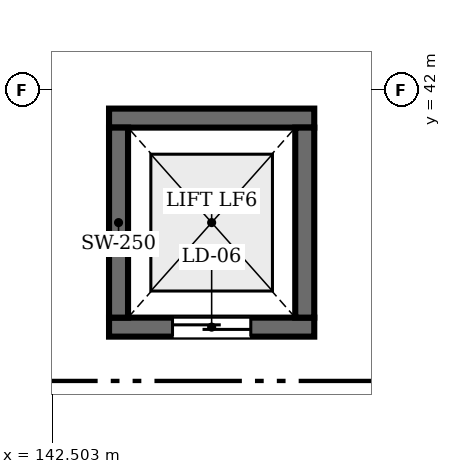
"""IFC4 building model, lengths in metres.
Left out: names, types, materials, properties, quantities, classifications, styles, units other than length and angle.
Written with IfcOpenShell. Run it as: python <this file> out.ifc"""

import sys

from ifc_helpers import new_model, si_unit, direction, frame, frame_2d, origin, place, context, subcontext, project, spatial, rectangle, extrude, element, fill, save


model = new_model("IFC4")
c1 = context("Model", 3, precision=1e-05, world=origin(), true_north=direction((0.0, 1.0)))
c2 = subcontext(c1, "Body", "Model", "MODEL_VIEW")
j1 = project(units=[si_unit("LENGTHUNIT", "METRE"), si_unit("PLANEANGLEUNIT", "RADIAN")], contexts=[c1])
p1 = place(None, origin())
s1 = spatial("IfcSite", under=j1, at=p1, CompositionType="ELEMENT")
p2 = place(p1, origin())
s2 = spatial("IfcBuilding", under=s1, at=p2, CompositionType="ELEMENT")
p3 = place(p2, frame((0.0, 0.0, -4.8)))
s3 = spatial("IfcBuildingStorey", under=s2, at=p3, CompositionType="ELEMENT", Elevation=-4.8)
p4 = place(p3, frame((143.25, 38.875, 0.0), z_axis=(0.0, 0.0, 1.0), x_axis=(1.0, 0.0, 0.0)))
e1 = element("IfcWall", 1, at=p4, inside=s3, PredefinedType="SHEAR", context=c2, shape_type="SweptSolid", body=[
    extrude(rectangle(XDim=2.7, YDim=0.25, at=frame_2d((1.35, 0.0))), origin(), (0.0, 0.0, 1.0), 4.395),
])
p5 = place(p4, frame((0.835, 0.0, 0.0)))
e2 = element("IfcOpeningElement", 2, at=p5, cuts=e1, PredefinedType="OPENING", context=c2, shape_type="SweptSolid", body=[
    extrude(rectangle(XDim=1.03, YDim=2.15, at=frame_2d((0.515, 1.075))), frame((0.0, 0.135, 0.0), z_axis=(0.0, -1.0, 0.0), x_axis=(1.0, 0.0, 0.0)), (0.0, 0.0, 1.0), 0.27),
])
p6 = place(p3, frame((143.25, 41.625, 0.0), z_axis=(0.0, 0.0, 1.0), x_axis=(1.0, 0.0, 0.0)))
e3 = element("IfcWall", 3, at=p6, inside=s3, PredefinedType="SHEAR", context=c2, shape_type="SweptSolid", body=[
    extrude(rectangle(XDim=2.7, YDim=0.25, at=frame_2d((1.35, 0.0))), origin(), (0.0, 0.0, 1.0), 4.395),
])
for number, where, z_axis, x_axis in (
    (4, (143.375, 39.0, 0.0), (0.0, 0.0, 1.0), (0.0, 1.0, 0.0)),
    (5, (145.825, 39.0, 0.0), (0.0, 0.0, 1.0), (0.0, 1.0, 0.0)),
):
    element("IfcWall", number, at=place(p3, frame(where, z_axis=z_axis, x_axis=x_axis)), inside=s3, PredefinedType="SHEAR", context=c2, shape_type="SweptSolid", body=[
        extrude(rectangle(XDim=2.5, YDim=0.25, at=frame_2d((1.25, 0.0))), origin(), (0.0, 0.0, 1.0), 4.395),
    ])
p7 = place(p5, origin())
e6 = element("IfcDoor", 6, at=p7, inside=s3, OperationType="SLIDING_TO_LEFT", PredefinedType="DOOR", context=c2, shape_type="SweptSolid", body=[
    extrude(rectangle(XDim=1.03, YDim=2.15, at=frame_2d((0.515, 1.075))), frame((0.0, 0.025, 0.0), z_axis=(0.0, -1.0, 0.0), x_axis=(1.0, 0.0, 0.0)), (0.0, 0.0, 1.0), 0.05),
])
fill(e2, e6)
save(model, sys.argv[1])
